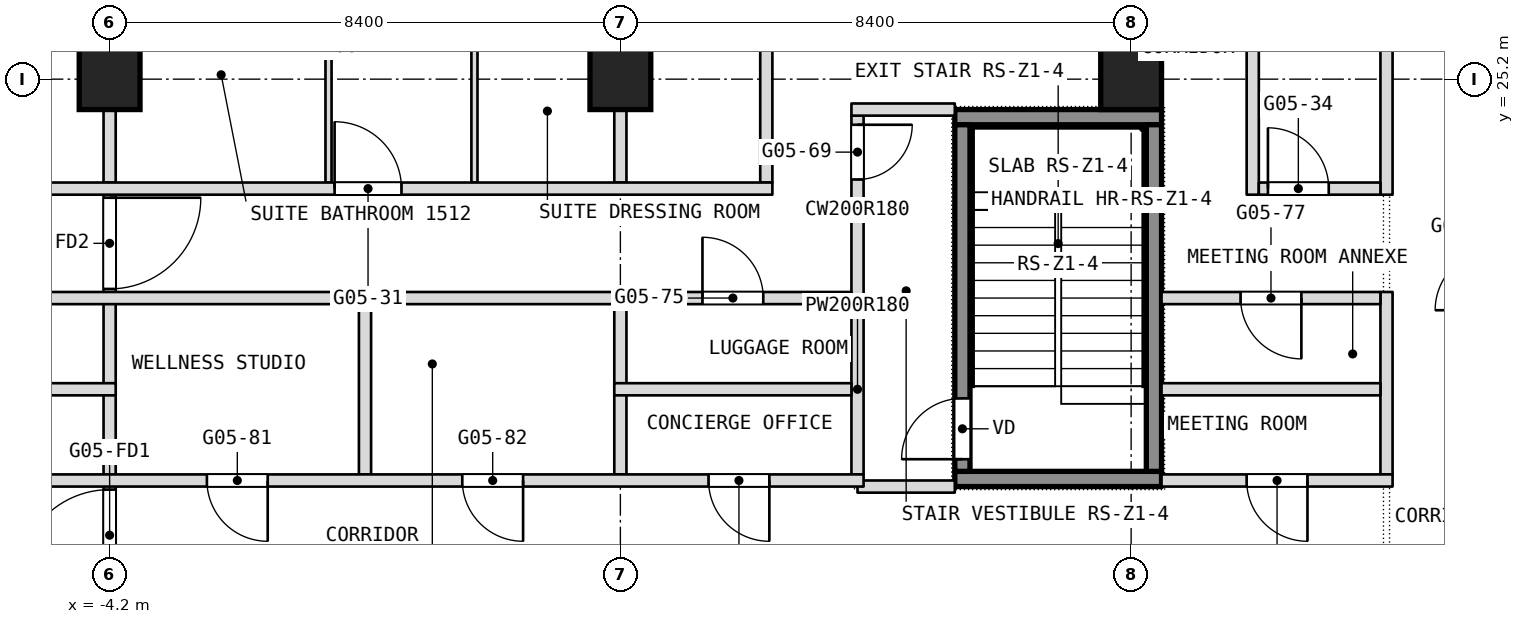
"""IFC4 building model, lengths in metres.
Left out: names, types, materials, properties, quantities, classifications, styles, units other than length and angle.
Written with IfcOpenShell. Run it as: python <this file> out.ifc"""

import sys

from ifc_helpers import new_model, si_unit, direction, frame, frame_2d, origin, origin_2d, place, context, subcontext, project, spatial, rectangle, extrude, element, fill, save


model = new_model("IFC4")
c1 = context("Model", 3, precision=1e-05, world=origin(), true_north=direction((0.0, 1.0)))
c2 = subcontext(c1, "Body", "Model", "MODEL_VIEW")
j1 = project(units=[si_unit("LENGTHUNIT", "METRE"), si_unit("PLANEANGLEUNIT", "RADIAN")], contexts=[c1])
p1 = place(None, origin())
s1 = spatial("IfcSite", under=j1, at=p1, CompositionType="ELEMENT")
p2 = place(p1, origin())
s2 = spatial("IfcBuilding", under=s1, at=p2, CompositionType="ELEMENT")
p3 = place(p2, frame((0.0, 0.0, 68.9)))
s3 = spatial("IfcBuildingStorey", under=s2, at=p3, CompositionType="ELEMENT", Elevation=68.9)
for number, where, z_axis, x_axis in (
    (1, (-4.2, 25.2, 0.0), (0.0, 0.0, 1.0), (1.0, 0.0, 0.0)),
    (2, (4.2, 25.2, 0.0), (0.0, 0.0, 1.0), (1.0, 0.0, 0.0)),
    (3, (12.6, 25.2, 0.0), (0.0, 0.0, 1.0), (1.0, 0.0, 0.0)),
):
    element("IfcColumn", number, at=place(p3, frame(where, z_axis=z_axis, x_axis=x_axis)), inside=s3, PredefinedType="COLUMN", context=c2, shape_type="SweptSolid", body=[
        extrude(rectangle(XDim=1.0, YDim=1.0, at=origin_2d()), origin(), (0.0, 0.0, 1.0), 3.6),
    ])
p4 = place(p3, frame((16.8, 18.7, 0.0), z_axis=(0.0, 0.0, 1.0), x_axis=(0.0, 1.0, 0.0)))
e4 = element("IfcWall", 4, at=p4, inside=s3, PredefinedType="PARTITIONING", context=c2, shape_type="SweptSolid", body=[
    extrude(rectangle(XDim=3.0, YDim=0.2, at=frame_2d((1.5, 0.0))), origin(), (0.0, 0.0, 1.0), 3.34),
])
p5 = place(p3, frame((16.8, 23.3, 0.0), z_axis=(0.0, 0.0, 1.0), x_axis=(0.0, 1.0, 0.0)))
e5 = element("IfcWall", 5, at=p5, inside=s3, PredefinedType="PARTITIONING", context=c2, shape_type="SweptSolid", body=[
    extrude(rectangle(XDim=10.24, YDim=0.2, at=frame_2d((5.12, 0.0))), origin(), (0.0, 0.0, 1.0), 3.34),
])
p6 = place(p3, frame((14.6, 23.3, 0.0), z_axis=(0.0, 0.0, 1.0), x_axis=(0.0, 1.0, 0.0)))
e6 = element("IfcWall", 6, at=p6, inside=s3, PredefinedType="PARTITIONING", context=c2, shape_type="SweptSolid", body=[
    extrude(rectangle(XDim=3.4, YDim=0.2, at=frame_2d((1.7, 0.0))), origin(), (0.0, 0.0, 1.0), 3.34),
])
p7 = place(p3, frame((8.1, 18.7, 0.0), z_axis=(0.0, 0.0, 1.0), x_axis=(0.0, 1.0, 0.0)))
e7 = element("IfcWall", 7, at=p7, inside=s3, PredefinedType="PARTITIONING", context=c2, shape_type="SweptSolid", body=[
    extrude(rectangle(XDim=2.8, YDim=0.2, at=frame_2d((1.4, 0.0))), origin(), (0.0, 0.0, 1.0), 3.34),
])
p8 = place(p3, frame((8.1, 21.5, 0.0), z_axis=(0.0, 0.0, 1.0), x_axis=(0.0, 1.0, 0.0)))
e8 = element("IfcWall", 8, at=p8, inside=s3, PredefinedType="PARTITIONING", context=c2, shape_type="SweptSolid", body=[
    extrude(rectangle(XDim=3.1, YDim=0.2, at=frame_2d((1.55, 0.0))), origin(), (0.0, 0.0, 1.0), 3.34),
])
p9 = place(p8, frame((2.05, 0.0, 0.0)))
e9 = element("IfcOpeningElement", 9, at=p9, cuts=e8, PredefinedType="OPENING", context=c2, shape_type="SweptSolid", body=[
    extrude(rectangle(XDim=0.9, YDim=2.1, at=frame_2d((0.45, 1.05))), frame((0.0, 0.1, 0.0), z_axis=(0.0, -1.0, 0.0), x_axis=(1.0, 0.0, 0.0)), (0.0, 0.0, 1.0), 0.2),
])
p10 = place(p3, frame((6.6, 23.5, 0.0), z_axis=(0.0, 0.0, 1.0), x_axis=(0.0, 1.0, 0.0)))
e10 = element("IfcWall", 10, at=p10, inside=s3, PredefinedType="PARTITIONING", context=c2, shape_type="SweptSolid", body=[
    extrude(rectangle(XDim=3.4, YDim=0.2, at=frame_2d((1.7, 0.0))), origin(), (0.0, 0.0, 1.0), 3.34),
])
p11 = place(p3, frame((4.2, 18.7, 0.0), z_axis=(0.0, 0.0, 1.0), x_axis=(0.0, 1.0, 0.0)))
e11 = element("IfcWall", 11, at=p11, inside=s3, PredefinedType="PARTITIONING", context=c2, shape_type="SweptSolid", body=[
    extrude(rectangle(XDim=2.8, YDim=0.2, at=frame_2d((1.4, 0.0))), origin(), (0.0, 0.0, 1.0), 3.34),
])
p12 = place(p3, frame((4.2, 23.5, 0.0), z_axis=(0.0, 0.0, 1.0), x_axis=(0.0, 1.0, 0.0)))
e12 = element("IfcWall", 12, at=p12, inside=s3, PredefinedType="PARTITIONING", context=c2, shape_type="SweptSolid", body=[
    extrude(rectangle(XDim=10.04, YDim=0.2, at=frame_2d((5.02, 0.0))), origin(), (0.0, 0.0, 1.0), 3.34),
])
p13 = place(p3, frame((1.8, 23.5, 0.0), z_axis=(0.0, 0.0, 1.0), x_axis=(0.0, 1.0, 0.0)))
e13 = element("IfcWall", 13, at=p13, inside=s3, PredefinedType="PARTITIONING", context=c2, shape_type="SweptSolid", body=[
    extrude(rectangle(XDim=3.45, YDim=0.1, at=frame_2d((1.725, 0.0))), origin(), (0.0, 0.0, 1.0), 3.34),
])
p14 = place(p3, frame((0.0, 18.7, 0.0), z_axis=(0.0, 0.0, 1.0), x_axis=(0.0, 1.0, 0.0)))
e14 = element("IfcWall", 14, at=p14, inside=s3, PredefinedType="PARTITIONING", context=c2, shape_type="SweptSolid", body=[
    extrude(rectangle(XDim=2.8, YDim=0.2, at=frame_2d((1.4, 0.0))), origin(), (0.0, 0.0, 1.0), 3.34),
])
p15 = place(p3, frame((-0.6, 23.5, 0.0), z_axis=(0.0, 0.0, 1.0), x_axis=(0.0, 1.0, 0.0)))
e15 = element("IfcWall", 15, at=p15, inside=s3, PredefinedType="PARTITIONING", context=c2, shape_type="SweptSolid", body=[
    extrude(rectangle(XDim=4.45, YDim=0.1, at=frame_2d((2.225, 0.0))), origin(), (0.0, 0.0, 1.0), 3.34),
])
p16 = place(p3, frame((-4.2, 16.8, 0.0), z_axis=(0.0, 0.0, 1.0), x_axis=(0.0, 1.0, 0.0)))
e16 = element("IfcWall", 16, at=p16, inside=s3, PredefinedType="PARTITIONING", context=c2, shape_type="SweptSolid", body=[
    extrude(rectangle(XDim=6.7, YDim=0.2, at=frame_2d((3.35, 0.0))), origin(), (0.0, 0.0, 1.0), 3.34),
])
p17 = place(p16, frame((0.15, 0.0, 0.0)))
e17 = element("IfcOpeningElement", 17, at=p17, cuts=e16, PredefinedType="OPENING", context=c2, shape_type="SweptSolid", body=[
    extrude(rectangle(XDim=1.5, YDim=2.1, at=frame_2d((0.75, 1.05))), frame((0.0, 0.1, 0.0), z_axis=(0.0, -1.0, 0.0), x_axis=(1.0, 0.0, 0.0)), (0.0, 0.0, 1.0), 0.2),
])
p18 = place(p16, frame((4.95, 0.0, 0.0)))
e18 = element("IfcOpeningElement", 18, at=p18, cuts=e16, PredefinedType="OPENING", context=c2, shape_type="SweptSolid", body=[
    extrude(rectangle(XDim=1.5, YDim=2.1, at=frame_2d((0.75, 1.05))), frame((0.0, 0.1, 0.0), z_axis=(0.0, -1.0, 0.0), x_axis=(1.0, 0.0, 0.0)), (0.0, 0.0, 1.0), 0.2),
])
p19 = place(p3, frame((-4.2, 23.5, 0.0), z_axis=(0.0, 0.0, 1.0), x_axis=(0.0, 1.0, 0.0)))
e19 = element("IfcWall", 19, at=p19, inside=s3, PredefinedType="PARTITIONING", context=c2, shape_type="SweptSolid", body=[
    extrude(rectangle(XDim=10.04, YDim=0.2, at=frame_2d((5.02, 0.0))), origin(), (0.0, 0.0, 1.0), 3.34),
])
p20 = place(p3, frame((8.1, 18.5, 0.0), z_axis=(0.0, 0.0, 1.0), x_axis=(1.0, 0.0, 0.0)))
e20 = element("IfcWall", 20, at=p20, inside=s3, PredefinedType="PARTITIONING", context=c2, shape_type="SweptSolid", body=[
    extrude(rectangle(XDim=1.6, YDim=0.2, at=frame_2d((0.8, 0.0))), origin(), (0.0, 0.0, 1.0), 3.34),
])
p21 = place(p3, frame((-16.9, 18.6, 0.0), z_axis=(0.0, 0.0, 1.0), x_axis=(1.0, 0.0, 0.0)))
e21 = element("IfcWall", 21, at=p21, inside=s3, PredefinedType="PARTITIONING", context=c2, shape_type="SweptSolid", body=[
    extrude(rectangle(XDim=25.1, YDim=0.2, at=frame_2d((12.55, 0.0))), origin(), (0.0, 0.0, 1.0), 3.34),
])
p22 = place(p21, frame((1.7, 0.0, 0.0)))
e22 = element("IfcOpeningElement", 22, at=p22, cuts=e21, PredefinedType="OPENING", context=c2, shape_type="SweptSolid", body=[
    extrude(rectangle(XDim=1.0, YDim=2.1, at=frame_2d((0.5, 1.05))), frame((0.0, 0.1, 0.0), z_axis=(0.0, -1.0, 0.0), x_axis=(1.0, 0.0, 0.0)), (0.0, 0.0, 1.0), 0.2),
])
p23 = place(p21, frame((8.0, 0.0, 0.0)))
e23 = element("IfcOpeningElement", 23, at=p23, cuts=e21, PredefinedType="OPENING", context=c2, shape_type="SweptSolid", body=[
    extrude(rectangle(XDim=1.0, YDim=2.1, at=frame_2d((0.5, 1.05))), frame((0.0, 0.1, 0.0), z_axis=(0.0, -1.0, 0.0), x_axis=(1.0, 0.0, 0.0)), (0.0, 0.0, 1.0), 0.2),
])
p24 = place(p21, frame((22.55, 0.0, 0.0)))
e24 = element("IfcOpeningElement", 24, at=p24, cuts=e21, PredefinedType="OPENING", context=c2, shape_type="SweptSolid", body=[
    extrude(rectangle(XDim=1.0, YDim=2.1, at=frame_2d((0.5, 1.05))), frame((0.0, 0.1, 0.0), z_axis=(0.0, -1.0, 0.0), x_axis=(1.0, 0.0, 0.0)), (0.0, 0.0, 1.0), 0.2),
])
p25 = place(p21, frame((14.3, 0.0, 0.0)))
e25 = element("IfcOpeningElement", 25, at=p25, cuts=e21, PredefinedType="OPENING", context=c2, shape_type="SweptSolid", body=[
    extrude(rectangle(XDim=1.0, YDim=2.1, at=frame_2d((0.5, 1.05))), frame((0.0, 0.1, 0.0), z_axis=(0.0, -1.0, 0.0), x_axis=(1.0, 0.0, 0.0)), (0.0, 0.0, 1.0), 0.2),
])
p26 = place(p21, frame((18.5, 0.0, 0.0)))
e26 = element("IfcOpeningElement", 26, at=p26, cuts=e21, PredefinedType="OPENING", context=c2, shape_type="SweptSolid", body=[
    extrude(rectangle(XDim=1.0, YDim=2.1, at=frame_2d((0.5, 1.05))), frame((0.0, 0.1, 0.0), z_axis=(0.0, -1.0, 0.0), x_axis=(1.0, 0.0, 0.0)), (0.0, 0.0, 1.0), 0.2),
])
p27 = place(p3, frame((13.1, 18.6, 0.0), z_axis=(0.0, 0.0, 1.0), x_axis=(1.0, 0.0, 0.0)))
e27 = element("IfcWall", 27, at=p27, inside=s3, PredefinedType="PARTITIONING", context=c2, shape_type="SweptSolid", body=[
    extrude(rectangle(XDim=3.8, YDim=0.2, at=frame_2d((1.9, 0.0))), origin(), (0.0, 0.0, 1.0), 3.34),
])
p28 = place(p27, frame((1.4, 0.0, 0.0)))
e28 = element("IfcOpeningElement", 28, at=p28, cuts=e27, PredefinedType="OPENING", context=c2, shape_type="SweptSolid", body=[
    extrude(rectangle(XDim=1.0, YDim=2.1, at=frame_2d((0.5, 1.05))), frame((0.0, 0.1, 0.0), z_axis=(0.0, -1.0, 0.0), x_axis=(1.0, 0.0, 0.0)), (0.0, 0.0, 1.0), 0.2),
])
p29 = place(p3, frame((-12.5, 20.1, 0.0), z_axis=(0.0, 0.0, 1.0), x_axis=(1.0, 0.0, 0.0)))
e29 = element("IfcWall", 29, at=p29, inside=s3, PredefinedType="PARTITIONING", context=c2, shape_type="SweptSolid", body=[
    extrude(rectangle(XDim=8.4, YDim=0.2, at=frame_2d((4.2, 0.0))), origin(), (0.0, 0.0, 1.0), 3.34),
])
p30 = place(p3, frame((4.1, 20.1, 0.0), z_axis=(0.0, 0.0, 1.0), x_axis=(1.0, 0.0, 0.0)))
e30 = element("IfcWall", 30, at=p30, inside=s3, PredefinedType="PARTITIONING", context=c2, shape_type="SweptSolid", body=[
    extrude(rectangle(XDim=3.9, YDim=0.2, at=frame_2d((1.95, 0.0))), origin(), (0.0, 0.0, 1.0), 3.34),
])
p31 = place(p3, frame((13.1, 20.1, 0.0), z_axis=(0.0, 0.0, 1.0), x_axis=(1.0, 0.0, 0.0)))
e31 = element("IfcWall", 31, at=p31, inside=s3, PredefinedType="PARTITIONING", context=c2, shape_type="SweptSolid", body=[
    extrude(rectangle(XDim=3.6, YDim=0.2, at=frame_2d((1.8, 0.0))), origin(), (0.0, 0.0, 1.0), 3.34),
])
p32 = place(p3, frame((-16.7, 21.6, 0.0), z_axis=(0.0, 0.0, 1.0), x_axis=(1.0, 0.0, 0.0)))
e32 = element("IfcWall", 32, at=p32, inside=s3, PredefinedType="PARTITIONING", context=c2, shape_type="SweptSolid", body=[
    extrude(rectangle(XDim=24.7, YDim=0.2, at=frame_2d((12.35, 0.0))), origin(), (0.0, 0.0, 1.0), 3.34),
])
p33 = place(p32, frame((7.8, 0.0, 0.0)))
e33 = element("IfcOpeningElement", 33, at=p33, cuts=e32, PredefinedType="OPENING", context=c2, shape_type="SweptSolid", body=[
    extrude(rectangle(XDim=1.0, YDim=2.1, at=frame_2d((0.5, 1.05))), frame((0.0, 0.1, 0.0), z_axis=(0.0, -1.0, 0.0), x_axis=(1.0, 0.0, 0.0)), (0.0, 0.0, 1.0), 0.2),
])
p34 = place(p32, frame((22.25, 0.0, 0.0)))
e34 = element("IfcOpeningElement", 34, at=p34, cuts=e32, PredefinedType="OPENING", context=c2, shape_type="SweptSolid", body=[
    extrude(rectangle(XDim=1.0, YDim=2.1, at=frame_2d((0.5, 1.05))), frame((0.0, 0.1, 0.0), z_axis=(0.0, -1.0, 0.0), x_axis=(1.0, 0.0, 0.0)), (0.0, 0.0, 1.0), 0.2),
])
p35 = place(p3, frame((13.1, 21.6, 0.0), z_axis=(0.0, 0.0, 1.0), x_axis=(1.0, 0.0, 0.0)))
e35 = element("IfcWall", 35, at=p35, inside=s3, PredefinedType="PARTITIONING", context=c2, shape_type="SweptSolid", body=[
    extrude(rectangle(XDim=3.6, YDim=0.2, at=frame_2d((1.8, 0.0))), origin(), (0.0, 0.0, 1.0), 3.34),
])
p36 = place(p35, frame((1.3, 0.0, 0.0)))
e36 = element("IfcOpeningElement", 36, at=p36, cuts=e35, PredefinedType="OPENING", context=c2, shape_type="SweptSolid", body=[
    extrude(rectangle(XDim=1.0, YDim=2.1, at=frame_2d((0.5, 1.05))), frame((0.0, 0.1, 0.0), z_axis=(0.0, -1.0, 0.0), x_axis=(1.0, 0.0, 0.0)), (0.0, 0.0, 1.0), 0.2),
])
p37 = place(p3, frame((-16.7, 23.4, 0.0), z_axis=(0.0, 0.0, 1.0), x_axis=(1.0, 0.0, 0.0)))
e37 = element("IfcWall", 37, at=p37, inside=s3, PredefinedType="PARTITIONING", context=c2, shape_type="SweptSolid", body=[
    extrude(rectangle(XDim=23.4, YDim=0.2, at=frame_2d((11.7, 0.0))), origin(), (0.0, 0.0, 1.0), 3.34),
])
p38 = place(p37, frame((2.4, 0.0, 0.0)))
e38 = element("IfcOpeningElement", 38, at=p38, cuts=e37, PredefinedType="OPENING", context=c2, shape_type="SweptSolid", body=[
    extrude(rectangle(XDim=0.9, YDim=2.1, at=frame_2d((0.45, 1.05))), frame((0.0, 0.1, 0.0), z_axis=(0.0, -1.0, 0.0), x_axis=(1.0, 0.0, 0.0)), (0.0, 0.0, 1.0), 0.2),
])
p39 = place(p37, frame((5.65, 0.0, 0.0)))
e39 = element("IfcOpeningElement", 39, at=p39, cuts=e37, PredefinedType="OPENING", context=c2, shape_type="SweptSolid", body=[
    extrude(rectangle(XDim=1.1, YDim=2.1, at=frame_2d((0.55, 1.05))), frame((0.0, 0.1, 0.0), z_axis=(0.0, -1.0, 0.0), x_axis=(1.0, 0.0, 0.0)), (0.0, 0.0, 1.0), 0.2),
])
p40 = place(p37, frame((16.2, 0.0, 0.0)))
e40 = element("IfcOpeningElement", 40, at=p40, cuts=e37, PredefinedType="OPENING", context=c2, shape_type="SweptSolid", body=[
    extrude(rectangle(XDim=1.1, YDim=2.1, at=frame_2d((0.55, 1.05))), frame((0.0, 0.1, 0.0), z_axis=(0.0, -1.0, 0.0), x_axis=(1.0, 0.0, 0.0)), (0.0, 0.0, 1.0), 0.2),
])
p41 = place(p3, frame((14.7, 23.4, 0.0), z_axis=(0.0, 0.0, 1.0), x_axis=(1.0, 0.0, 0.0)))
e41 = element("IfcWall", 41, at=p41, inside=s3, PredefinedType="PARTITIONING", context=c2, shape_type="SweptSolid", body=[
    extrude(rectangle(XDim=2.0, YDim=0.2, at=frame_2d((1.0, 0.0))), origin(), (0.0, 0.0, 1.0), 3.34),
])
p42 = place(p41, frame((0.15, 0.0, 0.0)))
e42 = element("IfcOpeningElement", 42, at=p42, cuts=e41, PredefinedType="OPENING", context=c2, shape_type="SweptSolid", body=[
    extrude(rectangle(XDim=1.0, YDim=2.1, at=frame_2d((0.5, 1.05))), frame((0.0, 0.1, 0.0), z_axis=(0.0, -1.0, 0.0), x_axis=(1.0, 0.0, 0.0)), (0.0, 0.0, 1.0), 0.2),
])
p43 = place(p3, frame((8.0, 24.7, 0.0), z_axis=(0.0, 0.0, 1.0), x_axis=(1.0, 0.0, 0.0)))
e43 = element("IfcWall", 43, at=p43, inside=s3, PredefinedType="PARTITIONING", context=c2, shape_type="SweptSolid", body=[
    extrude(rectangle(XDim=1.7, YDim=0.2, at=frame_2d((0.85, 0.0))), origin(), (0.0, 0.0, 1.0), 3.34),
])
for number, where, z_axis, x_axis in (
    (44, (9.7, 18.625, 0.1), (0.0, 0.0, 1.0), (1.0, 0.0, 0.0)),
    (45, (9.7, 24.575, 0.1), (0.0, 0.0, 1.0), (1.0, 0.0, 0.0)),
):
    element("IfcWall", number, at=place(p3, frame(where, z_axis=z_axis, x_axis=x_axis)), inside=s3, PredefinedType="SHEAR", context=c2, shape_type="SweptSolid", body=[
        extrude(rectangle(XDim=3.4, YDim=0.25, at=frame_2d((1.7, 0.0))), origin(), (0.0, 0.0, 1.0), 3.6),
    ])
p44 = place(p3, frame((9.825, 18.75, 0.1), z_axis=(0.0, 0.0, 1.0), x_axis=(0.0, 1.0, 0.0)))
e46 = element("IfcWall", 46, at=p44, inside=s3, PredefinedType="SHEAR", context=c2, shape_type="SweptSolid", body=[
    extrude(rectangle(XDim=5.7, YDim=0.25, at=frame_2d((2.85, 0.0))), origin(), (0.0, 0.0, 1.0), 3.6),
])
p45 = place(p44, frame((0.2, 0.0, 0.0)))
e47 = element("IfcOpeningElement", 47, at=p45, cuts=e46, PredefinedType="OPENING", context=c2, shape_type="SweptSolid", body=[
    extrude(rectangle(XDim=1.0, YDim=2.1, at=frame_2d((0.5, 1.05))), frame((0.0, 0.125, 0.0), z_axis=(0.0, -1.0, 0.0), x_axis=(1.0, 0.0, 0.0)), (0.0, 0.0, 1.0), 0.25),
])
p46 = place(p3, frame((12.975, 18.75, 0.1), z_axis=(0.0, 0.0, 1.0), x_axis=(0.0, 1.0, 0.0)))
e48 = element("IfcWall", 48, at=p46, inside=s3, PredefinedType="SHEAR", context=c2, shape_type="SweptSolid", body=[
    extrude(rectangle(XDim=5.7, YDim=0.25, at=frame_2d((2.85, 0.0))), origin(), (0.0, 0.0, 1.0), 3.6),
])
p47 = place(p9, origin())
e49 = element("IfcDoor", 49, at=p47, inside=s3, OperationType="SINGLE_SWING_LEFT", PredefinedType="DOOR", context=c2, shape_type="SweptSolid", body=[
    extrude(rectangle(XDim=0.9, YDim=2.1, at=frame_2d((0.45, 1.05))), frame((0.0, 0.025, 0.0), z_axis=(0.0, -1.0, 0.0), x_axis=(1.0, 0.0, 0.0)), (0.0, 0.0, 1.0), 0.05),
])
fill(e9, e49)
p48 = place(p24, origin())
e50 = element("IfcDoor", 50, at=p48, inside=s3, OperationType="SINGLE_SWING_RIGHT", PredefinedType="DOOR", context=c2, shape_type="SweptSolid", body=[
    extrude(rectangle(XDim=1.0, YDim=2.1, at=frame_2d((0.5, 1.05))), frame((0.0, 0.025, 0.0), z_axis=(0.0, -1.0, 0.0), x_axis=(1.0, 0.0, 0.0)), (0.0, 0.0, 1.0), 0.05),
])
fill(e24, e50)
p49 = place(p25, origin())
e51 = element("IfcDoor", 51, at=p49, inside=s3, OperationType="SINGLE_SWING_LEFT", PredefinedType="DOOR", context=c2, shape_type="SweptSolid", body=[
    extrude(rectangle(XDim=1.0, YDim=2.1, at=frame_2d((0.5, 1.05))), frame((0.0, 0.025, 0.0), z_axis=(0.0, -1.0, 0.0), x_axis=(1.0, 0.0, 0.0)), (0.0, 0.0, 1.0), 0.05),
])
fill(e25, e51)
p50 = place(p26, origin())
e52 = element("IfcDoor", 52, at=p50, inside=s3, OperationType="SINGLE_SWING_RIGHT", PredefinedType="DOOR", context=c2, shape_type="SweptSolid", body=[
    extrude(rectangle(XDim=1.0, YDim=2.1, at=frame_2d((0.5, 1.05))), frame((0.0, 0.025, 0.0), z_axis=(0.0, -1.0, 0.0), x_axis=(1.0, 0.0, 0.0)), (0.0, 0.0, 1.0), 0.05),
])
fill(e26, e52)
p51 = place(p28, origin())
e53 = element("IfcDoor", 53, at=p51, inside=s3, OperationType="SINGLE_SWING_LEFT", PredefinedType="DOOR", context=c2, shape_type="SweptSolid", body=[
    extrude(rectangle(XDim=1.0, YDim=2.1, at=frame_2d((0.5, 1.05))), frame((0.0, 0.025, 0.0), z_axis=(0.0, -1.0, 0.0), x_axis=(1.0, 0.0, 0.0)), (0.0, 0.0, 1.0), 0.05),
])
fill(e28, e53)
p52 = place(p34, origin())
e54 = element("IfcDoor", 54, at=p52, inside=s3, OperationType="SINGLE_SWING_LEFT", PredefinedType="DOOR", context=c2, shape_type="SweptSolid", body=[
    extrude(rectangle(XDim=1.0, YDim=2.1, at=frame_2d((0.5, 1.05))), frame((0.0, 0.025, 0.0), z_axis=(0.0, -1.0, 0.0), x_axis=(1.0, 0.0, 0.0)), (0.0, 0.0, 1.0), 0.05),
])
fill(e34, e54)
p53 = place(p36, origin())
e55 = element("IfcDoor", 55, at=p53, inside=s3, OperationType="SINGLE_SWING_RIGHT", PredefinedType="DOOR", context=c2, shape_type="SweptSolid", body=[
    extrude(rectangle(XDim=1.0, YDim=2.1, at=frame_2d((0.5, 1.05))), frame((0.0, 0.025, 0.0), z_axis=(0.0, -1.0, 0.0), x_axis=(1.0, 0.0, 0.0)), (0.0, 0.0, 1.0), 0.05),
])
fill(e36, e55)
p54 = place(p40, origin())
e56 = element("IfcDoor", 56, at=p54, inside=s3, OperationType="SINGLE_SWING_LEFT", PredefinedType="DOOR", context=c2, shape_type="SweptSolid", body=[
    extrude(rectangle(XDim=1.1, YDim=2.1, at=frame_2d((0.55, 1.05))), frame((0.0, 0.025, 0.0), z_axis=(0.0, -1.0, 0.0), x_axis=(1.0, 0.0, 0.0)), (0.0, 0.0, 1.0), 0.05),
])
fill(e40, e56)
p55 = place(p42, origin())
e57 = element("IfcDoor", 57, at=p55, inside=s3, OperationType="SINGLE_SWING_LEFT", PredefinedType="DOOR", context=c2, shape_type="SweptSolid", body=[
    extrude(rectangle(XDim=1.0, YDim=2.1, at=frame_2d((0.5, 1.05))), frame((0.0, 0.025, 0.0), z_axis=(0.0, -1.0, 0.0), x_axis=(1.0, 0.0, 0.0)), (0.0, 0.0, 1.0), 0.05),
])
fill(e42, e57)
p56 = place(p45, origin())
e58 = element("IfcDoor", 58, at=p56, inside=s3, OperationType="SINGLE_SWING_LEFT", PredefinedType="DOOR", context=c2, shape_type="SweptSolid", body=[
    extrude(rectangle(XDim=1.0, YDim=2.1, at=frame_2d((0.5, 1.05))), frame((0.0, 0.025, 0.0), z_axis=(0.0, -1.0, 0.0), x_axis=(1.0, 0.0, 0.0)), (0.0, 0.0, 1.0), 0.05),
])
fill(e47, e58)
p57 = place(p17, origin())
e59 = element("IfcDoor", 59, at=p57, inside=s3, OperationType="DOUBLE_DOOR_DOUBLE_SWING", PredefinedType="DOOR", context=c2, shape_type="SweptSolid", body=[
    extrude(rectangle(XDim=1.5, YDim=2.1, at=frame_2d((0.75, 1.05))), frame((0.0, 0.025, 0.0), z_axis=(0.0, -1.0, 0.0), x_axis=(1.0, 0.0, 0.0)), (0.0, 0.0, 1.0), 0.05),
])
fill(e17, e59)
p58 = place(p18, origin())
e60 = element("IfcDoor", 60, at=p58, inside=s3, OperationType="DOUBLE_DOOR_DOUBLE_SWING", PredefinedType="DOOR", context=c2, shape_type="SweptSolid", body=[
    extrude(rectangle(XDim=1.5, YDim=2.1, at=frame_2d((0.75, 1.05))), frame((0.0, 0.025, 0.0), z_axis=(0.0, -1.0, 0.0), x_axis=(1.0, 0.0, 0.0)), (0.0, 0.0, 1.0), 0.05),
])
fill(e18, e60)
save(model, sys.argv[1])
